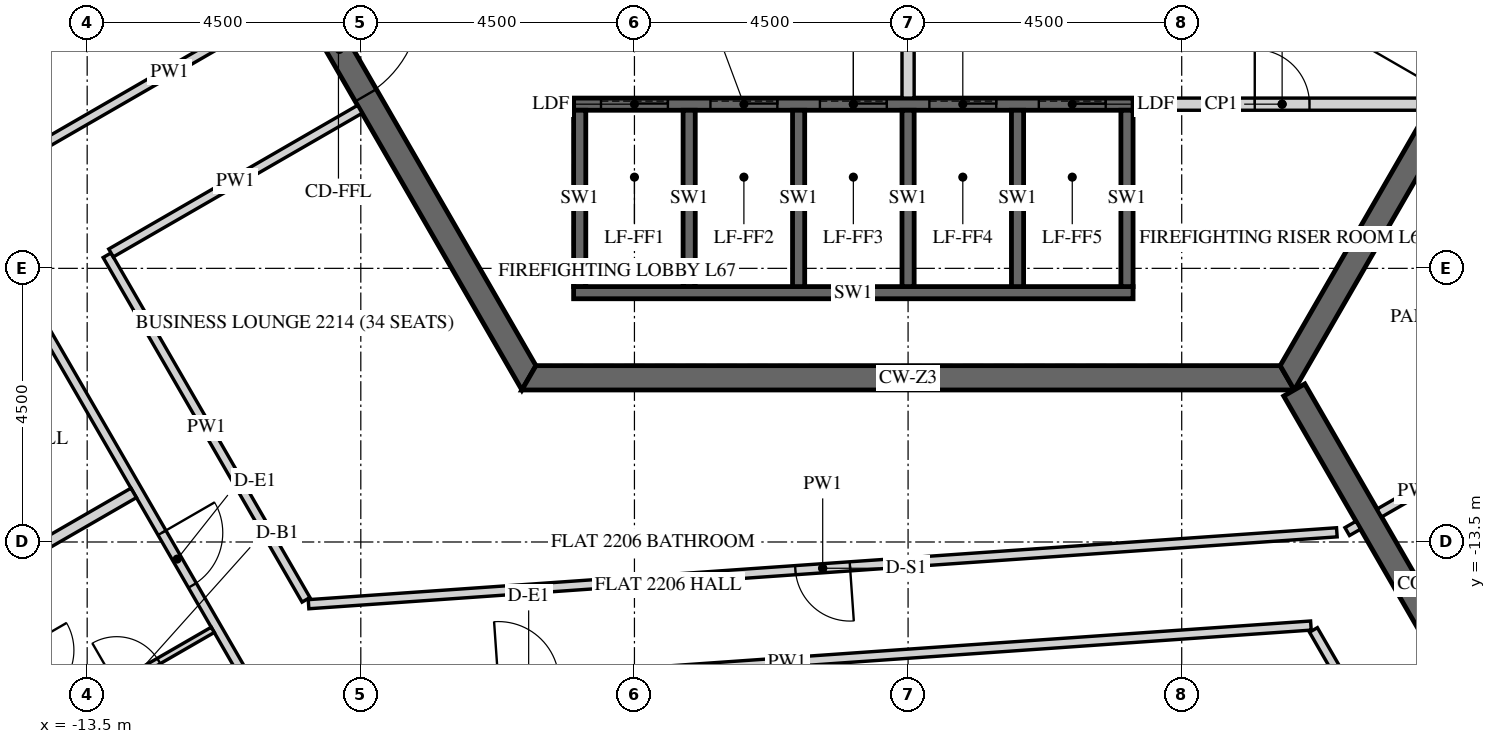
"""IFC4 building model, lengths in metres.
Left out: names, types, materials, properties, quantities, classifications, styles, units other than length and angle.
Written with IfcOpenShell. Run it as: python <this file> out.ifc"""

import sys

from ifc_helpers import new_model, si_unit, direction, frame, frame_2d, origin, place, context, subcontext, project, spatial, polyline, rectangle, outline, extrude, element, fill, save


model = new_model("IFC4")
c1 = context("Model", 3, precision=1e-05, world=origin(), true_north=direction((0.0, 1.0)))
c2 = subcontext(c1, "Body", "Model", "MODEL_VIEW")
j1 = project(units=[si_unit("LENGTHUNIT", "METRE"), si_unit("PLANEANGLEUNIT", "RADIAN")], contexts=[c1])
p1 = place(None, origin())
s1 = spatial("IfcSite", under=j1, at=p1, CompositionType="ELEMENT")
p2 = place(p1, origin())
s2 = spatial("IfcBuilding", under=s1, at=p2, CompositionType="ELEMENT")
p3 = place(p2, frame((0.0, 0.0, 279.6)))
s3 = spatial("IfcBuildingStorey", under=s2, at=p3, CompositionType="ELEMENT", Elevation=279.6)
p4 = place(p3, frame((-12.471, 0.0, -0.15), z_axis=(0.0, 0.0, 1.0), x_axis=(0.499996419489, -0.866027470984, 0.0)))
e1 = element("IfcWall", 1, at=p4, inside=s3, PredefinedType="SHEAR", context=c2, shape_type="SweptSolid", body=[
    extrude(outline(polyline([(-0.115, -0.2), (12.586, -0.2), (12.355, 0.2), (0.115, 0.2), (-0.115, -0.2)])), origin(), (0.0, 0.0, 1.0), 3.9),
])
p5 = place(p4, frame((5.306, 0.0, 0.15)))
e2 = element("IfcOpeningElement", 2, at=p5, cuts=e1, PredefinedType="OPENING", context=c2, shape_type="SweptSolid", body=[
    extrude(rectangle(XDim=1.8, YDim=2.4, at=frame_2d((0.9, 1.2))), frame((0.0, 0.21, 0.0), z_axis=(0.0, -1.0, 0.0), x_axis=(1.0, 0.0, 0.0)), (0.0, 0.0, 1.0), 0.42),
])
p6 = place(p3, frame((-6.235, -10.8, -0.15), z_axis=(0.0, 0.0, 1.0), x_axis=(1.0, 0.0, 0.0)))
e3 = element("IfcWall", 3, at=p6, inside=s3, PredefinedType="SHEAR", context=c2, shape_type="SweptSolid", body=[
    extrude(outline(polyline([(-0.115, -0.2), (12.586, -0.2), (12.355, 0.2), (0.115, 0.2), (-0.115, -0.2)])), origin(), (0.0, 0.0, 1.0), 3.9),
])
p7 = place(p3, frame((6.235, -10.8, -0.15), z_axis=(0.0, 0.0, 1.0), x_axis=(0.499996419489, 0.866027470984, 0.0)))
e4 = element("IfcWall", 4, at=p7, inside=s3, PredefinedType="SHEAR", context=c2, shape_type="SweptSolid", body=[
    extrude(outline(polyline([(-0.115, -0.2), (12.586, -0.2), (12.355, 0.2), (0.115, 0.2), (-0.115, -0.2)])), origin(), (0.0, 0.0, 1.0), 3.9),
])
p8 = place(p7, frame((5.364, 0.0, 0.15)))
e5 = element("IfcOpeningElement", 5, at=p8, cuts=e4, PredefinedType="OPENING", context=c2, shape_type="SweptSolid", body=[
    extrude(rectangle(XDim=1.8, YDim=2.4, at=frame_2d((0.9, 1.2))), frame((0.0, 0.21, 0.0), z_axis=(0.0, -1.0, 0.0), x_axis=(1.0, 0.0, 0.0)), (0.0, 0.0, 1.0), 0.42),
])
p9 = place(p3, frame((6.351, -11.0, -0.15), z_axis=(0.0, 0.0, 1.0), x_axis=(0.499998894578, -0.866026041999, 0.0)))
e6 = element("IfcWall", 6, at=p9, inside=s3, PredefinedType="SHEAR", context=c2, shape_type="SweptSolid", body=[
    extrude(rectangle(XDim=15.544, YDim=0.4, at=frame_2d((7.772, 0.0))), origin(), (0.0, 0.0, 1.0), 3.9),
])
p10 = place(p9, frame((6.872, 0.0, 0.15)))
e7 = element("IfcOpeningElement", 7, at=p10, cuts=e6, PredefinedType="OPENING", context=c2, shape_type="SweptSolid", body=[
    extrude(rectangle(XDim=1.8, YDim=2.4, at=frame_2d((0.9, 1.2))), frame((0.0, 0.21, 0.0), z_axis=(0.0, -1.0, 0.0), x_axis=(1.0, 0.0, 0.0)), (0.0, 0.0, 1.0), 0.42),
])
p11 = place(p3, frame((-5.5, -6.3, -0.25), z_axis=(0.0, 0.0, 1.0), x_axis=(1.0, 0.0, 0.0)))
e8 = element("IfcWall", 8, at=p11, inside=s3, PredefinedType="SHEAR", context=c2, shape_type="SweptSolid", body=[
    extrude(rectangle(XDim=9.2, YDim=0.2, at=frame_2d((4.6, 0.0))), origin(), (0.0, 0.0, 1.0), 3.9),
])
p12 = place(p11, frame((0.45, 0.0, 0.25)))
e9 = element("IfcOpeningElement", 9, at=p12, cuts=e8, PredefinedType="OPENING", context=c2, shape_type="SweptSolid", body=[
    extrude(rectangle(XDim=1.1, YDim=2.1, at=frame_2d((0.55, 1.05))), frame((0.0, 0.11, 0.0), z_axis=(0.0, -1.0, 0.0), x_axis=(1.0, 0.0, 0.0)), (0.0, 0.0, 1.0), 0.22),
])
p13 = place(p11, frame((2.25, 0.0, 0.25)))
e10 = element("IfcOpeningElement", 10, at=p13, cuts=e8, PredefinedType="OPENING", context=c2, shape_type="SweptSolid", body=[
    extrude(rectangle(XDim=1.1, YDim=2.1, at=frame_2d((0.55, 1.05))), frame((0.0, 0.11, 0.0), z_axis=(0.0, -1.0, 0.0), x_axis=(1.0, 0.0, 0.0)), (0.0, 0.0, 1.0), 0.22),
])
p14 = place(p11, frame((4.05, 0.0, 0.25)))
e11 = element("IfcOpeningElement", 11, at=p14, cuts=e8, PredefinedType="OPENING", context=c2, shape_type="SweptSolid", body=[
    extrude(rectangle(XDim=1.1, YDim=2.1, at=frame_2d((0.55, 1.05))), frame((0.0, 0.11, 0.0), z_axis=(0.0, -1.0, 0.0), x_axis=(1.0, 0.0, 0.0)), (0.0, 0.0, 1.0), 0.22),
])
p15 = place(p11, frame((5.85, 0.0, 0.25)))
e12 = element("IfcOpeningElement", 12, at=p15, cuts=e8, PredefinedType="OPENING", context=c2, shape_type="SweptSolid", body=[
    extrude(rectangle(XDim=1.1, YDim=2.1, at=frame_2d((0.55, 1.05))), frame((0.0, 0.11, 0.0), z_axis=(0.0, -1.0, 0.0), x_axis=(1.0, 0.0, 0.0)), (0.0, 0.0, 1.0), 0.22),
])
p16 = place(p11, frame((7.65, 0.0, 0.25)))
e13 = element("IfcOpeningElement", 13, at=p16, cuts=e8, PredefinedType="OPENING", context=c2, shape_type="SweptSolid", body=[
    extrude(rectangle(XDim=1.1, YDim=2.1, at=frame_2d((0.55, 1.05))), frame((0.0, 0.11, 0.0), z_axis=(0.0, -1.0, 0.0), x_axis=(1.0, 0.0, 0.0)), (0.0, 0.0, 1.0), 0.22),
])
p17 = place(p3, frame((-5.5, -9.4, -0.25), z_axis=(0.0, 0.0, 1.0), x_axis=(1.0, 0.0, 0.0)))
e14 = element("IfcWall", 14, at=p17, inside=s3, PredefinedType="SHEAR", context=c2, shape_type="SweptSolid", body=[
    extrude(rectangle(XDim=9.2, YDim=0.2, at=frame_2d((4.6, 0.0))), origin(), (0.0, 0.0, 1.0), 3.9),
])
for number, where, z_axis, x_axis in (
    (15, (-5.4, -9.3, -0.25), (0.0, 0.0, 1.0), (0.0, 1.0, 0.0)),
    (16, (-3.6, -9.3, -0.25), (0.0, 0.0, 1.0), (0.0, 1.0, 0.0)),
    (17, (-1.8, -9.3, -0.25), (0.0, 0.0, 1.0), (0.0, 1.0, 0.0)),
    (18, (0.0, -9.3, -0.25), (0.0, 0.0, 1.0), (0.0, 1.0, 0.0)),
    (19, (1.8, -9.3, -0.25), (0.0, 0.0, 1.0), (0.0, 1.0, 0.0)),
    (20, (3.6, -9.3, -0.25), (0.0, 0.0, 1.0), (0.0, 1.0, 0.0)),
):
    element("IfcWall", number, at=place(p3, frame(where, z_axis=z_axis, x_axis=x_axis)), inside=s3, PredefinedType="SHEAR", context=c2, shape_type="SweptSolid", body=[
        extrude(rectangle(XDim=2.9, YDim=0.2, at=frame_2d((1.45, 0.0))), origin(), (0.0, 0.0, 1.0), 3.9),
    ])
p18 = place(p3, frame((0.0, -6.2, 0.0), z_axis=(0.0, 0.0, 1.0), x_axis=(0.0, 1.0, 0.0)))
e21 = element("IfcWall", 21, at=p18, inside=s3, PredefinedType="PARTITIONING", context=c2, shape_type="SweptSolid", body=[
    extrude(rectangle(XDim=6.1, YDim=0.2, at=frame_2d((3.05, 0.0))), origin(), (0.0, 0.0, 1.0), 3.65),
])
p19 = place(p3, frame((3.7, -6.3, 0.0), z_axis=(0.0, 0.0, 1.0), x_axis=(1.0, 0.0, 0.0)))
e22 = element("IfcWall", 22, at=p19, inside=s3, PredefinedType="PARTITIONING", context=c2, shape_type="SweptSolid", body=[
    extrude(rectangle(XDim=4.903, YDim=0.2, at=frame_2d((2.451, 0.0))), origin(), (0.0, 0.0, 1.0), 3.65),
])
p20 = place(p19, frame((2.001, 0.0, 0.0)))
e23 = element("IfcOpeningElement", 23, at=p20, cuts=e22, PredefinedType="OPENING", context=c2, shape_type="SweptSolid", body=[
    extrude(rectangle(XDim=0.9, YDim=2.1, at=frame_2d((0.45, 1.05))), frame((0.0, 0.11, 0.0), z_axis=(0.0, -1.0, 0.0), x_axis=(1.0, 0.0, 0.0)), (0.0, 0.0, 1.0), 0.22),
])
p21 = place(p3, frame((-18.338, -2.838, 0.0), z_axis=(0.0, 0.0, 1.0), x_axis=(0.499999693481, -0.866025580753, 0.0)))
e24 = element("IfcWall", 24, at=p21, inside=s3, PredefinedType="PARTITIONING", context=c2, shape_type="SweptSolid", body=[
    extrude(rectangle(XDim=15.296, YDim=0.15, at=frame_2d((7.648, 0.0))), origin(), (0.0, 0.0, 1.0), 2.988),
])
p22 = place(p21, frame((2.325, 0.0, 0.0)))
e25 = element("IfcOpeningElement", 25, at=p22, cuts=e24, PredefinedType="OPENING", context=c2, shape_type="SweptSolid", body=[
    extrude(rectangle(XDim=1.0, YDim=2.1, at=frame_2d((0.5, 1.05))), frame((0.0, 0.085, 0.0), z_axis=(0.0, -1.0, 0.0), x_axis=(1.0, 0.0, 0.0)), (0.0, 0.0, 1.0), 0.17),
])
p23 = place(p21, frame((12.136, 0.0, 0.0)))
e26 = element("IfcOpeningElement", 26, at=p23, cuts=e24, PredefinedType="OPENING", context=c2, shape_type="SweptSolid", body=[
    extrude(rectangle(XDim=1.0, YDim=2.1, at=frame_2d((0.5, 1.05))), frame((0.0, 0.085, 0.0), z_axis=(0.0, -1.0, 0.0), x_axis=(1.0, 0.0, 0.0)), (0.0, 0.0, 1.0), 0.17),
])
p24 = place(p3, frame((-10.606, -16.079, 0.0), z_axis=(0.0, 0.0, 1.0), x_axis=(0.997563356349, 0.069766396426, 0.0)))
e27 = element("IfcWall", 27, at=p24, inside=s3, PredefinedType="PARTITIONING", context=c2, shape_type="SweptSolid", body=[
    extrude(rectangle(XDim=17.273, YDim=0.15, at=frame_2d((8.636, 0.0))), origin(), (0.0, 0.0, 1.0), 2.988),
])
p25 = place(p24, frame((3.877, 0.0, 0.0)))
e28 = element("IfcOpeningElement", 28, at=p25, cuts=e27, PredefinedType="OPENING", context=c2, shape_type="SweptSolid", body=[
    extrude(rectangle(XDim=1.0, YDim=2.1, at=frame_2d((0.5, 1.05))), frame((0.0, 0.085, 0.0), z_axis=(0.0, -1.0, 0.0), x_axis=(1.0, 0.0, 0.0)), (0.0, 0.0, 1.0), 0.17),
])
p26 = place(p3, frame((6.666, -14.946, 0.0), z_axis=(0.0, 0.0, 1.0), x_axis=(0.499979539361, -0.866037216418, 0.0)))
e29 = element("IfcWall", 29, at=p26, inside=s3, PredefinedType="PARTITIONING", context=c2, shape_type="SweptSolid", body=[
    extrude(rectangle(XDim=7.097, YDim=0.15, at=frame_2d((3.548, 0.0))), origin(), (0.0, 0.0, 1.0), 2.988),
])
p27 = place(p26, frame((3.696, 0.0, 0.0)))
e30 = element("IfcOpeningElement", 30, at=p27, cuts=e29, PredefinedType="OPENING", context=c2, shape_type="SweptSolid", body=[
    extrude(rectangle(XDim=1.0, YDim=2.1, at=frame_2d((0.5, 1.05))), frame((0.0, 0.085, 0.0), z_axis=(0.0, -1.0, 0.0), x_axis=(1.0, 0.0, 0.0)), (0.0, 0.0, 1.0), 0.17),
])
p28 = place(p3, frame((-10.066, -4.566, 0.0), z_axis=(0.0, 0.0, 1.0), x_axis=(-0.866037363387, -0.499979284789, 0.0)))
e31 = element("IfcWall", 31, at=p28, inside=s3, PredefinedType="PARTITIONING", context=c2, shape_type="SweptSolid", body=[
    extrude(rectangle(XDim=4.8, YDim=0.15, at=frame_2d((2.4, 0.0))), origin(), (0.0, 0.0, 1.0), 2.988),
])
p29 = place(p3, frame((7.404, -13.224, 0.0), z_axis=(0.0, 0.0, 1.0), x_axis=(-0.866088799389, -0.499890179513, 0.0)))
e32 = element("IfcWall", 32, at=p29, inside=s3, PredefinedType="PARTITIONING", context=c2, shape_type="SweptSolid", body=[
    extrude(rectangle(XDim=0.21, YDim=0.15, at=frame_2d((0.105, 0.0))), origin(), (0.0, 0.0, 1.0), 2.988),
])
p30 = place(p3, frame((7.051, -13.341, 0.0), z_axis=(0.0, 0.0, 1.0), x_axis=(-0.997563599815, -0.069762915103, 0.0)))
e33 = element("IfcWall", 33, at=p30, inside=s3, PredefinedType="PARTITIONING", context=c2, shape_type="SweptSolid", body=[
    extrude(rectangle(XDim=16.952, YDim=0.15, at=frame_2d((8.476, 0.0))), origin(), (0.0, 0.0, 1.0), 2.988),
])
p31 = place(p30, frame((8.026, 0.0, 0.0)))
e34 = element("IfcOpeningElement", 34, at=p31, cuts=e33, PredefinedType="OPENING", context=c2, shape_type="SweptSolid", body=[
    extrude(rectangle(XDim=0.9, YDim=2.1, at=frame_2d((0.45, 1.05))), frame((0.0, 0.085, 0.0), z_axis=(0.0, -1.0, 0.0), x_axis=(1.0, 0.0, 0.0)), (0.0, 0.0, 1.0), 0.17),
])
p32 = place(p3, frame((-9.901, -14.451, 0.0), z_axis=(0.0, 0.0, 1.0), x_axis=(-0.49999161165, 0.866030246746, 0.0)))
e35 = element("IfcWall", 35, at=p32, inside=s3, PredefinedType="PARTITIONING", context=c2, shape_type="SweptSolid", body=[
    extrude(rectangle(XDim=6.543, YDim=0.15, at=frame_2d((3.271, 0.0))), origin(), (0.0, 0.0, 1.0), 2.988),
])
p33 = place(p3, frame((-13.108, -8.747, 0.0), z_axis=(0.0, 0.0, 1.0), x_axis=(0.866024684746, 0.500001245408, 0.0)))
e36 = element("IfcWall", 36, at=p33, inside=s3, PredefinedType="PARTITIONING", context=c2, shape_type="SweptSolid", body=[
    extrude(rectangle(XDim=4.725, YDim=0.15, at=frame_2d((2.363, 0.0))), origin(), (0.0, 0.0, 1.0), 2.988),
])
p34 = place(p3, frame((8.984, -12.311, 0.0), z_axis=(0.0, 0.0, 1.0), x_axis=(-0.866020080793, -0.500009219579, 0.0)))
e37 = element("IfcWall", 37, at=p34, inside=s3, PredefinedType="PARTITIONING", context=c2, shape_type="SweptSolid", body=[
    extrude(rectangle(XDim=1.425, YDim=0.15, at=frame_2d((0.712, 0.0))), origin(), (0.0, 0.0, 1.0), 2.988),
])
p35 = place(p3, frame((-19.771, -16.755, 0.0), z_axis=(0.0, 0.0, 1.0), x_axis=(0.866022959057, 0.500004234368, 0.0)))
e38 = element("IfcWall", 38, at=p35, inside=s3, PredefinedType="PARTITIONING", context=c2, shape_type="SweptSolid", body=[
    extrude(rectangle(XDim=8.125, YDim=0.18, at=frame_2d((4.062, 0.0))), origin(), (0.0, 0.0, 1.0), 2.988),
])
p36 = place(p3, frame((-13.968, -16.407, 0.0), z_axis=(0.0, 0.0, 1.0), x_axis=(0.866046596414, 0.499963291492, 0.0)))
e39 = element("IfcWall", 39, at=p36, inside=s3, PredefinedType="PARTITIONING", context=c2, shape_type="SweptSolid", body=[
    extrude(rectangle(XDim=2.925, YDim=0.1, at=frame_2d((1.462, 0.0))), origin(), (0.0, 0.0, 1.0), 2.988),
])
p37 = place(p36, frame((1.1, 0.0, 0.0)))
e40 = element("IfcOpeningElement", 40, at=p37, cuts=e39, PredefinedType="OPENING", context=c2, shape_type="SweptSolid", body=[
    extrude(rectangle(XDim=0.8, YDim=2.1, at=frame_2d((0.4, 1.05))), frame((0.0, 0.06, 0.0), z_axis=(0.0, -1.0, 0.0), x_axis=(1.0, 0.0, 0.0)), (0.0, 0.0, 1.0), 0.12),
])
p38 = place(p3, frame((-15.223, -14.233, 0.0), z_axis=(0.0, 0.0, 1.0), x_axis=(0.500000007376, -0.866025399526, 0.0)))
e41 = element("IfcWall", 41, at=p38, inside=s3, PredefinedType="PARTITIONING", context=c2, shape_type="SweptSolid", body=[
    extrude(rectangle(XDim=2.462, YDim=0.1, at=frame_2d((1.231, 0.0))), origin(), (0.0, 0.0, 1.0), 2.988),
])
p39 = place(p38, frame((0.15, 0.0, 0.0)))
e42 = element("IfcOpeningElement", 42, at=p39, cuts=e41, PredefinedType="OPENING", context=c2, shape_type="SweptSolid", body=[
    extrude(rectangle(XDim=0.9, YDim=2.1, at=frame_2d((0.45, 1.05))), frame((0.0, 0.06, 0.0), z_axis=(0.0, -1.0, 0.0), x_axis=(1.0, 0.0, 0.0)), (0.0, 0.0, 1.0), 0.12),
])
p40 = place(p38, frame((1.21, 0.0, 0.0)))
e43 = element("IfcOpeningElement", 43, at=p40, cuts=e41, PredefinedType="OPENING", context=c2, shape_type="SweptSolid", body=[
    extrude(rectangle(XDim=0.9, YDim=2.1, at=frame_2d((0.45, 1.05))), frame((0.0, 0.06, 0.0), z_axis=(0.0, -1.0, 0.0), x_axis=(1.0, 0.0, 0.0)), (0.0, 0.0, 1.0), 0.12),
])
p41 = place(p5, origin())
e44 = element("IfcDoor", 44, at=p41, inside=s3, OperationType="DOUBLE_DOOR_SINGLE_SWING", PredefinedType="DOOR", context=c2, shape_type="SweptSolid", body=[
    extrude(rectangle(XDim=1.8, YDim=2.4, at=frame_2d((0.9, 1.2))), frame((0.0, 0.025, 0.0), z_axis=(0.0, -1.0, 0.0), x_axis=(1.0, 0.0, 0.0)), (0.0, 0.0, 1.0), 0.05),
])
fill(e2, e44)
p42 = place(p20, origin())
e45 = element("IfcDoor", 45, at=p42, inside=s3, OperationType="SINGLE_SWING_LEFT", PredefinedType="DOOR", context=c2, shape_type="SweptSolid", body=[
    extrude(rectangle(XDim=0.9, YDim=2.1, at=frame_2d((0.45, 1.05))), frame((0.0, 0.025, 0.0), z_axis=(0.0, -1.0, 0.0), x_axis=(1.0, 0.0, 0.0)), (0.0, 0.0, 1.0), 0.05),
])
fill(e23, e45)
p43 = place(p12, origin())
e46 = element("IfcDoor", 46, at=p43, inside=s3, OperationType="SLIDING_TO_LEFT", PredefinedType="DOOR", context=c2, shape_type="SweptSolid", body=[
    extrude(rectangle(XDim=1.1, YDim=2.1, at=frame_2d((0.55, 1.05))), frame((0.0, 0.025, 0.0), z_axis=(0.0, -1.0, 0.0), x_axis=(1.0, 0.0, 0.0)), (0.0, 0.0, 1.0), 0.05),
])
fill(e9, e46)
p44 = place(p13, origin())
e47 = element("IfcDoor", 47, at=p44, inside=s3, OperationType="SLIDING_TO_LEFT", PredefinedType="DOOR", context=c2, shape_type="SweptSolid", body=[
    extrude(rectangle(XDim=1.1, YDim=2.1, at=frame_2d((0.55, 1.05))), frame((0.0, 0.025, 0.0), z_axis=(0.0, -1.0, 0.0), x_axis=(1.0, 0.0, 0.0)), (0.0, 0.0, 1.0), 0.05),
])
fill(e10, e47)
p45 = place(p14, origin())
e48 = element("IfcDoor", 48, at=p45, inside=s3, OperationType="SLIDING_TO_LEFT", PredefinedType="DOOR", context=c2, shape_type="SweptSolid", body=[
    extrude(rectangle(XDim=1.1, YDim=2.1, at=frame_2d((0.55, 1.05))), frame((0.0, 0.025, 0.0), z_axis=(0.0, -1.0, 0.0), x_axis=(1.0, 0.0, 0.0)), (0.0, 0.0, 1.0), 0.05),
])
fill(e11, e48)
p46 = place(p15, origin())
e49 = element("IfcDoor", 49, at=p46, inside=s3, OperationType="SLIDING_TO_LEFT", PredefinedType="DOOR", context=c2, shape_type="SweptSolid", body=[
    extrude(rectangle(XDim=1.1, YDim=2.1, at=frame_2d((0.55, 1.05))), frame((0.0, 0.025, 0.0), z_axis=(0.0, -1.0, 0.0), x_axis=(1.0, 0.0, 0.0)), (0.0, 0.0, 1.0), 0.05),
])
fill(e12, e49)
p47 = place(p16, origin())
e50 = element("IfcDoor", 50, at=p47, inside=s3, OperationType="SLIDING_TO_LEFT", PredefinedType="DOOR", context=c2, shape_type="SweptSolid", body=[
    extrude(rectangle(XDim=1.1, YDim=2.1, at=frame_2d((0.55, 1.05))), frame((0.0, 0.025, 0.0), z_axis=(0.0, -1.0, 0.0), x_axis=(1.0, 0.0, 0.0)), (0.0, 0.0, 1.0), 0.05),
])
fill(e13, e50)
p48 = place(p23, origin())
e51 = element("IfcDoor", 51, at=p48, inside=s3, OperationType="SINGLE_SWING_RIGHT", PredefinedType="DOOR", context=c2, shape_type="SweptSolid", body=[
    extrude(rectangle(XDim=1.0, YDim=2.1, at=frame_2d((0.5, 1.05))), frame((0.0, 0.025, 0.0), z_axis=(0.0, -1.0, 0.0), x_axis=(1.0, 0.0, 0.0)), (0.0, 0.0, 1.0), 0.05),
])
fill(e26, e51)
p49 = place(p37, origin())
e52 = element("IfcDoor", 52, at=p49, inside=s3, OperationType="SINGLE_SWING_LEFT", PredefinedType="DOOR", context=c2, shape_type="SweptSolid", body=[
    extrude(rectangle(XDim=0.8, YDim=2.1, at=frame_2d((0.4, 1.05))), frame((0.0, 0.025, 0.0), z_axis=(0.0, -1.0, 0.0), x_axis=(1.0, 0.0, 0.0)), (0.0, 0.0, 1.0), 0.05),
])
fill(e40, e52)
p50 = place(p31, origin())
e53 = element("IfcDoor", 53, at=p50, inside=s3, OperationType="SINGLE_SWING_LEFT", PredefinedType="DOOR", context=c2, shape_type="SweptSolid", body=[
    extrude(rectangle(XDim=0.9, YDim=2.1, at=frame_2d((0.45, 1.05))), frame((0.0, 0.025, 0.0), z_axis=(0.0, -1.0, 0.0), x_axis=(1.0, 0.0, 0.0)), (0.0, 0.0, 1.0), 0.05),
])
fill(e34, e53)
save(model, sys.argv[1])
